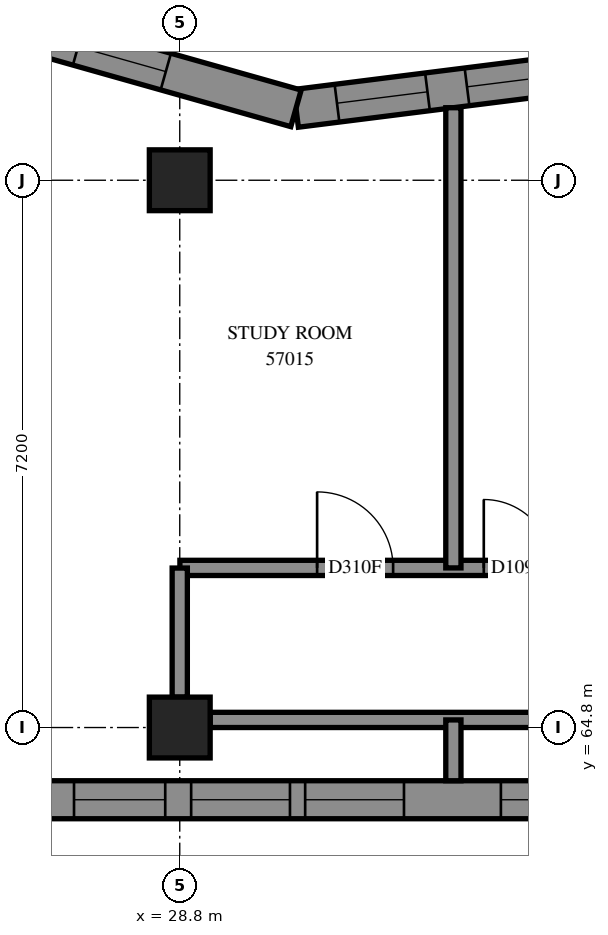
"""IFC4 building model, lengths in metres.
Left out: names, types, materials, properties, quantities, classifications, styles, units other than length and angle.
Written with IfcOpenShell. Run it as: python <this file> out.ifc"""

import sys

from ifc_helpers import new_model, si_unit, direction, frame, frame_2d, origin, origin_2d, place, context, subcontext, project, spatial, polyline, rectangle, outline, extrude, element, fill, save


model = new_model("IFC4")
c1 = context("Model", 3, precision=1e-05, world=origin(), true_north=direction((0.0, 1.0)))
c2 = subcontext(c1, "Body", "Model", "MODEL_VIEW")
j1 = project(units=[si_unit("LENGTHUNIT", "METRE"), si_unit("PLANEANGLEUNIT", "RADIAN")], contexts=[c1])
p1 = place(None, origin())
s1 = spatial("IfcSite", under=j1, at=p1, CompositionType="ELEMENT")
p2 = place(p1, origin())
s2 = spatial("IfcBuilding", under=s1, at=p2, CompositionType="ELEMENT")
p3 = place(p2, frame((0.0, 0.0, 210.0)))
s3 = spatial("IfcBuildingStorey", under=s2, at=p3, CompositionType="ELEMENT", Elevation=210.0)
for number, where, z_axis, x_axis in (
    (1, (28.8, 64.8, 0.0), (0.0, 0.0, 1.0), (1.0, 0.0, 0.0)),
    (2, (28.8, 72.0, 0.0), (0.0, 0.0, 1.0), (1.0, 0.0, 0.0)),
):
    element("IfcColumn", number, at=place(p3, frame(where, z_axis=z_axis, x_axis=x_axis)), inside=s3, PredefinedType="COLUMN", context=c2, shape_type="SweptSolid", body=[
        extrude(rectangle(XDim=0.8, YDim=0.8, at=origin_2d()), origin(), (0.0, 0.0, 1.0), 3.1),
    ])
p4 = place(p3, frame((34.179, 73.43, 0.0), z_axis=(0.0, 0.0, 1.0), x_axis=(-0.9921760365, -0.1248467561, 0.0)))
e3 = element("IfcWall", 3, at=p4, inside=s3, PredefinedType="SOLIDWALL", context=c2, shape_type="SweptSolid", body=[
    extrude(outline(polyline([(-0.032, -0.25), (3.829, -0.25), (3.931, 0.25), (0.032, 0.25), (-0.032, -0.25)])), origin(), (0.0, 0.0, 1.0), 3.1),
])
p5 = place(p4, frame((0.412, 0.0, 0.45)))
e4 = element("IfcOpeningElement", 4, at=p5, cuts=e3, PredefinedType="OPENING", context=c2, shape_type="SweptSolid", body=[
    extrude(rectangle(XDim=1.2, YDim=2.5, at=frame_2d((0.6, 1.25))), frame((0.0, 0.26, 0.0), z_axis=(0.0, -1.0, 0.0), x_axis=(1.0, 0.0, 0.0)), (0.0, 0.0, 1.0), 0.52),
])
p6 = place(p4, frame((2.136, 0.0, 0.45)))
e5 = element("IfcOpeningElement", 5, at=p6, cuts=e3, PredefinedType="OPENING", context=c2, shape_type="SweptSolid", body=[
    extrude(rectangle(XDim=1.2, YDim=2.5, at=frame_2d((0.6, 1.25))), frame((0.0, 0.26, 0.0), z_axis=(0.0, -1.0, 0.0), x_axis=(1.0, 0.0, 0.0)), (0.0, 0.0, 1.0), 0.52),
])
p7 = place(p3, frame((30.329, 72.946, 0.0), z_axis=(0.0, 0.0, 1.0), x_axis=(-0.9623435242, 0.2718362401, 0.0)))
e6 = element("IfcWall", 6, at=p7, inside=s3, PredefinedType="SOLIDWALL", context=c2, shape_type="SweptSolid", body=[
    extrude(outline(polyline([(0.051, -0.25), (4.031, -0.25), (3.37, 0.25), (-0.051, 0.25), (0.051, -0.25)])), origin(), (0.0, 0.0, 1.0), 3.1),
])
p8 = place(p7, frame((1.78, 0.0, 0.45)))
e7 = element("IfcOpeningElement", 7, at=p8, cuts=e6, PredefinedType="OPENING", context=c2, shape_type="SweptSolid", body=[
    extrude(rectangle(XDim=1.2, YDim=2.5, at=frame_2d((0.6, 1.25))), frame((0.0, 0.26, 0.0), z_axis=(0.0, -1.0, 0.0), x_axis=(1.0, 0.0, 0.0)), (0.0, 0.0, 1.0), 0.52),
])
p9 = place(p3, frame((26.768, 63.85, 0.0), z_axis=(0.0, 0.0, 1.0), x_axis=(1.0, 0.0, 0.0)))
e8 = element("IfcWall", 8, at=p9, inside=s3, PredefinedType="SOLIDWALL", context=c2, shape_type="SweptSolid", body=[
    extrude(outline(polyline([(-0.25, -0.25), (8.032, -0.25), (8.532, 0.25), (0.25, 0.25), (-0.25, -0.25)])), origin(), (0.0, 0.0, 1.0), 3.1),
])
p10 = place(p9, frame((2.182, 0.0, 0.45)))
e9 = element("IfcOpeningElement", 9, at=p10, cuts=e8, PredefinedType="OPENING", context=c2, shape_type="SweptSolid", body=[
    extrude(rectangle(XDim=1.3, YDim=2.5, at=frame_2d((0.65, 1.25))), frame((0.0, 0.26, 0.0), z_axis=(0.0, -1.0, 0.0), x_axis=(1.0, 0.0, 0.0)), (0.0, 0.0, 1.0), 0.52),
])
p11 = place(p9, frame((3.682, 0.0, 0.45)))
e10 = element("IfcOpeningElement", 10, at=p11, cuts=e8, PredefinedType="OPENING", context=c2, shape_type="SweptSolid", body=[
    extrude(rectangle(XDim=1.3, YDim=2.5, at=frame_2d((0.65, 1.25))), frame((0.0, 0.26, 0.0), z_axis=(0.0, -1.0, 0.0), x_axis=(1.0, 0.0, 0.0)), (0.0, 0.0, 1.0), 0.52),
])
p12 = place(p9, frame((0.641, 0.0, 0.45)))
e11 = element("IfcOpeningElement", 11, at=p12, cuts=e8, PredefinedType="OPENING", context=c2, shape_type="SweptSolid", body=[
    extrude(rectangle(XDim=1.2, YDim=2.5, at=frame_2d((0.6, 1.25))), frame((0.0, 0.26, 0.0), z_axis=(0.0, -1.0, 0.0), x_axis=(1.0, 0.0, 0.0)), (0.0, 0.0, 1.0), 0.52),
])
p13 = place(p9, frame((6.257, 0.0, 0.45)))
e12 = element("IfcOpeningElement", 12, at=p13, cuts=e8, PredefinedType="OPENING", context=c2, shape_type="SweptSolid", body=[
    extrude(rectangle(XDim=1.2, YDim=2.5, at=frame_2d((0.6, 1.25))), frame((0.0, 0.26, 0.0), z_axis=(0.0, -1.0, 0.0), x_axis=(1.0, 0.0, 0.0)), (0.0, 0.0, 1.0), 0.52),
])
p14 = place(p3, frame((28.802, 66.9, 0.0), z_axis=(0.0, 0.0, 1.0), x_axis=(1.0, 0.0, 0.0)))
e13 = element("IfcWall", 13, at=p14, inside=s3, PredefinedType="PARTITIONING", context=c2, shape_type="SweptSolid", body=[
    extrude(rectangle(XDim=11.798, YDim=0.2, at=frame_2d((5.899, 0.0))), origin(), (0.0, 0.0, 1.0), 3.1),
])
p15 = place(p14, frame((1.805, 0.0, 0.0)))
e14 = element("IfcOpeningElement", 14, at=p15, cuts=e13, PredefinedType="OPENING", context=c2, shape_type="SweptSolid", body=[
    extrude(rectangle(XDim=1.0, YDim=2.1, at=frame_2d((0.5, 1.05))), frame((0.0, 0.11, 0.0), z_axis=(0.0, -1.0, 0.0), x_axis=(1.0, 0.0, 0.0)), (0.0, 0.0, 1.0), 0.22),
])
p16 = place(p14, frame((3.998, 0.0, 0.0)))
e15 = element("IfcOpeningElement", 15, at=p16, cuts=e13, PredefinedType="OPENING", context=c2, shape_type="SweptSolid", body=[
    extrude(rectangle(XDim=0.9, YDim=2.1, at=frame_2d((0.45, 1.05))), frame((0.0, 0.11, 0.0), z_axis=(0.0, -1.0, 0.0), x_axis=(1.0, 0.0, 0.0)), (0.0, 0.0, 1.0), 0.22),
])
p17 = place(p14, frame((9.448, 0.0, 0.0)))
e16 = element("IfcOpeningElement", 16, at=p17, cuts=e13, PredefinedType="OPENING", context=c2, shape_type="SweptSolid", body=[
    extrude(rectangle(XDim=0.9, YDim=2.1, at=frame_2d((0.45, 1.05))), frame((0.0, 0.11, 0.0), z_axis=(0.0, -1.0, 0.0), x_axis=(1.0, 0.0, 0.0)), (0.0, 0.0, 1.0), 0.22),
])
p18 = place(p3, frame((29.2, 64.9, 0.0), z_axis=(0.0, 0.0, 1.0), x_axis=(1.0, 0.0, 0.0)))
e17 = element("IfcWall", 17, at=p18, inside=s3, PredefinedType="PARTITIONING", context=c2, shape_type="SweptSolid", body=[
    extrude(rectangle(XDim=6.4, YDim=0.2, at=frame_2d((3.2, 0.0))), origin(), (0.0, 0.0, 1.0), 2.6),
])
p19 = place(p3, frame((32.4, 66.9, 0.0), z_axis=(0.0, 0.0, 1.0), x_axis=(0.0, 1.0, 0.0)))
e18 = element("IfcWall", 18, at=p19, inside=s3, PredefinedType="PARTITIONING", context=c2, shape_type="SweptSolid", body=[
    extrude(rectangle(XDim=6.054, YDim=0.2, at=frame_2d((3.027, 0.0))), origin(), (0.0, 0.0, 1.0), 3.1),
])
p20 = place(p3, frame((28.8, 65.2, 0.0), z_axis=(0.0, 0.0, 1.0), x_axis=(0.0, 1.0, 0.0)))
e19 = element("IfcWall", 19, at=p20, inside=s3, PredefinedType="PARTITIONING", context=c2, shape_type="SweptSolid", body=[
    extrude(rectangle(XDim=1.698, YDim=0.2, at=frame_2d((0.849, 0.0))), origin(), (0.0, 0.0, 1.0), 2.6),
])
p21 = place(p3, frame((32.4, 64.1, 0.0), z_axis=(0.0, 0.0, 1.0), x_axis=(0.0, 1.0, 0.0)))
e20 = element("IfcWall", 20, at=p21, inside=s3, PredefinedType="PARTITIONING", context=c2, shape_type="SweptSolid", body=[
    extrude(rectangle(XDim=0.8, YDim=0.2, at=frame_2d((0.4, 0.0))), origin(), (0.0, 0.0, 1.0), 3.1),
])
p22 = place(p5, origin())
e21 = element("IfcWindow", 21, at=p22, inside=s3, PartitioningType="SINGLE_PANEL", PredefinedType="WINDOW", context=c2, shape_type="SweptSolid", body=[
    extrude(rectangle(XDim=1.2, YDim=2.5, at=frame_2d((0.6, 1.25))), frame((0.0, 0.18, 0.0), z_axis=(0.0, -1.0, 0.0), x_axis=(1.0, 0.0, 0.0)), (0.0, 0.0, 1.0), 0.06),
])
fill(e4, e21)
p23 = place(p6, origin())
e22 = element("IfcWindow", 22, at=p23, inside=s3, PartitioningType="SINGLE_PANEL", PredefinedType="WINDOW", context=c2, shape_type="SweptSolid", body=[
    extrude(rectangle(XDim=1.2, YDim=2.5, at=frame_2d((0.6, 1.25))), frame((0.0, 0.18, 0.0), z_axis=(0.0, -1.0, 0.0), x_axis=(1.0, 0.0, 0.0)), (0.0, 0.0, 1.0), 0.06),
])
fill(e5, e22)
p24 = place(p8, origin())
e23 = element("IfcWindow", 23, at=p24, inside=s3, PartitioningType="SINGLE_PANEL", PredefinedType="WINDOW", context=c2, shape_type="SweptSolid", body=[
    extrude(rectangle(XDim=1.2, YDim=2.5, at=frame_2d((0.6, 1.25))), frame((0.0, 0.18, 0.0), z_axis=(0.0, -1.0, 0.0), x_axis=(1.0, 0.0, 0.0)), (0.0, 0.0, 1.0), 0.06),
])
fill(e7, e23)
p25 = place(p10, origin())
e24 = element("IfcWindow", 24, at=p25, inside=s3, PartitioningType="SINGLE_PANEL", PredefinedType="WINDOW", context=c2, shape_type="SweptSolid", body=[
    extrude(rectangle(XDim=1.3, YDim=2.5, at=frame_2d((0.65, 1.25))), frame((0.0, 0.18, 0.0), z_axis=(0.0, -1.0, 0.0), x_axis=(1.0, 0.0, 0.0)), (0.0, 0.0, 1.0), 0.06),
])
fill(e9, e24)
p26 = place(p11, origin())
e25 = element("IfcWindow", 25, at=p26, inside=s3, PartitioningType="SINGLE_PANEL", PredefinedType="WINDOW", context=c2, shape_type="SweptSolid", body=[
    extrude(rectangle(XDim=1.3, YDim=2.5, at=frame_2d((0.65, 1.25))), frame((0.0, 0.18, 0.0), z_axis=(0.0, -1.0, 0.0), x_axis=(1.0, 0.0, 0.0)), (0.0, 0.0, 1.0), 0.06),
])
fill(e10, e25)
p27 = place(p12, origin())
e26 = element("IfcWindow", 26, at=p27, inside=s3, PartitioningType="SINGLE_PANEL", PredefinedType="WINDOW", context=c2, shape_type="SweptSolid", body=[
    extrude(rectangle(XDim=1.2, YDim=2.5, at=frame_2d((0.6, 1.25))), frame((0.0, 0.18, 0.0), z_axis=(0.0, -1.0, 0.0), x_axis=(1.0, 0.0, 0.0)), (0.0, 0.0, 1.0), 0.06),
])
fill(e11, e26)
p28 = place(p13, origin())
e27 = element("IfcWindow", 27, at=p28, inside=s3, PartitioningType="SINGLE_PANEL", PredefinedType="WINDOW", context=c2, shape_type="SweptSolid", body=[
    extrude(rectangle(XDim=1.2, YDim=2.5, at=frame_2d((0.6, 1.25))), frame((0.0, 0.18, 0.0), z_axis=(0.0, -1.0, 0.0), x_axis=(1.0, 0.0, 0.0)), (0.0, 0.0, 1.0), 0.06),
])
fill(e12, e27)
p29 = place(p15, origin())
e28 = element("IfcDoor", 28, at=p29, inside=s3, OperationType="SINGLE_SWING_RIGHT", PredefinedType="DOOR", context=c2, shape_type="SweptSolid", body=[
    extrude(rectangle(XDim=1.0, YDim=2.1, at=frame_2d((0.5, 1.05))), frame((0.0, 0.025, 0.0), z_axis=(0.0, -1.0, 0.0), x_axis=(1.0, 0.0, 0.0)), (0.0, 0.0, 1.0), 0.05),
])
fill(e14, e28)
p30 = place(p16, origin())
e29 = element("IfcDoor", 29, at=p30, inside=s3, OperationType="SINGLE_SWING_LEFT", PredefinedType="DOOR", context=c2, shape_type="SweptSolid", body=[
    extrude(rectangle(XDim=0.9, YDim=2.1, at=frame_2d((0.45, 1.05))), frame((0.0, 0.025, 0.0), z_axis=(0.0, -1.0, 0.0), x_axis=(1.0, 0.0, 0.0)), (0.0, 0.0, 1.0), 0.05),
])
fill(e15, e29)
save(model, sys.argv[1])
